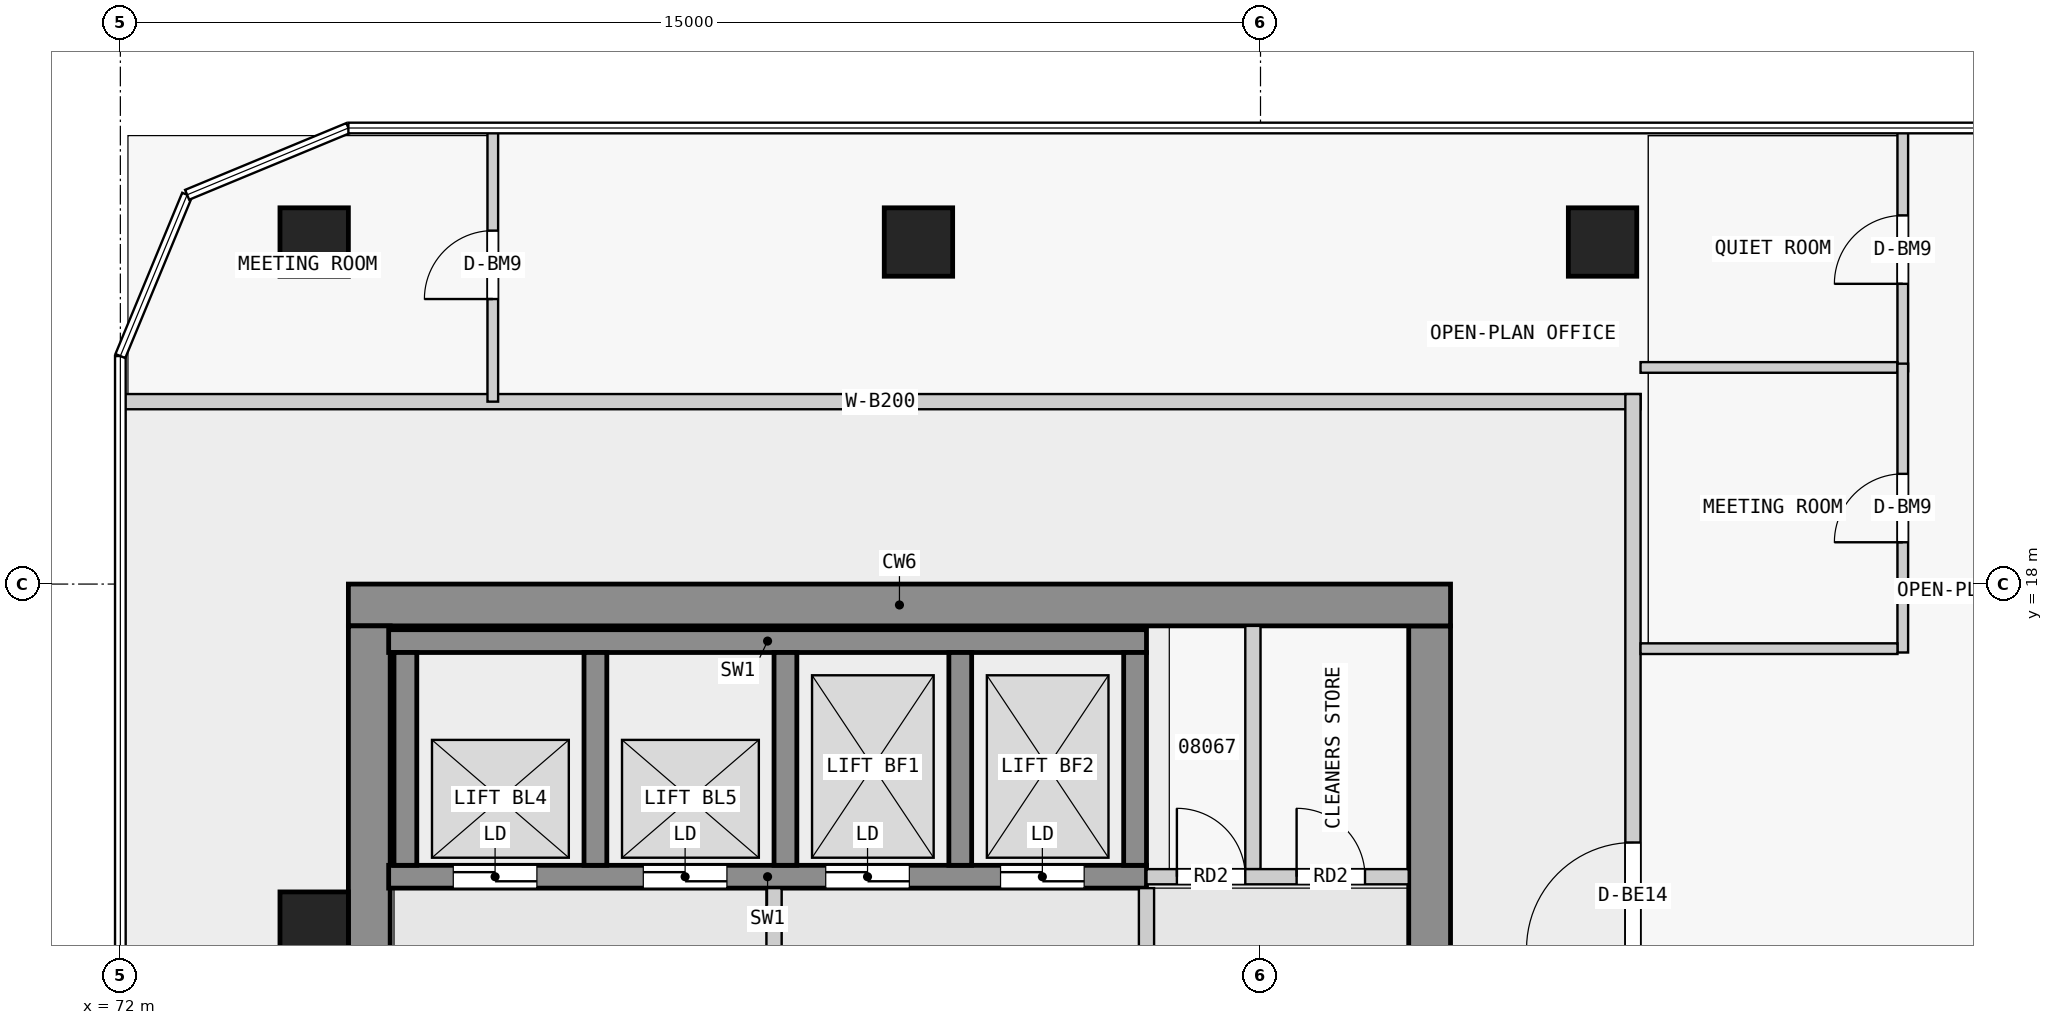
"""IFC4 building model, lengths in metres.
Left out: names, types, materials, properties, quantities, classifications, styles, units other than length and angle.
Written with IfcOpenShell. Run it as: python <this file> out.ifc"""

import sys

from ifc_helpers import new_model, si_unit, direction, frame, frame_2d, origin, origin_2d, place, context, subcontext, project, spatial, rectangle, extrude, element, fill, save


model = new_model("IFC4")
c1 = context("Model", 3, precision=1e-05, world=origin(), true_north=direction((0.0, 1.0)))
c2 = subcontext(c1, "Body", "Model", "MODEL_VIEW")
j1 = project(units=[si_unit("LENGTHUNIT", "METRE"), si_unit("PLANEANGLEUNIT", "RADIAN")], contexts=[c1])
p1 = place(None, origin())
s1 = spatial("IfcSite", under=j1, at=p1, CompositionType="ELEMENT")
p2 = place(p1, origin())
s2 = spatial("IfcBuilding", under=s1, at=p2, CompositionType="ELEMENT")
p3 = place(p2, frame((0.0, 0.0, 37.3)))
s3 = spatial("IfcBuildingStorey", under=s2, at=p3, CompositionType="ELEMENT", Elevation=37.3)
for number, where, z_axis, x_axis in (
    (1, (91.5, 22.5, 0.0), (0.0, 0.0, 1.0), (1.0, 0.0, 0.0)),
    (2, (82.5, 22.5, 0.0), (0.0, 0.0, 1.0), (1.0, 0.0, 0.0)),
    (3, (74.55, 22.5, 0.0), (0.0, 0.0, 1.0), (1.0, 0.0, 0.0)),
    (4, (74.55, 13.5, 0.0), (0.0, 0.0, 1.0), (1.0, 0.0, 0.0)),
):
    element("IfcColumn", number, at=place(p3, frame(where, z_axis=z_axis, x_axis=x_axis)), inside=s3, PredefinedType="COLUMN", context=c2, shape_type="SweptSolid", body=[
        extrude(rectangle(XDim=0.9, YDim=0.9, at=origin_2d()), origin(), (0.0, 0.0, 1.0), 3.5),
    ])
p4 = place(p3, frame((75.0, 17.725, 0.0), z_axis=(0.0, 0.0, 1.0), x_axis=(1.0, 0.0, 0.0)))
e5 = element("IfcWall", 5, at=p4, inside=s3, PredefinedType="SHEAR", context=c2, shape_type="SweptSolid", body=[
    extrude(rectangle(XDim=14.5, YDim=0.55, at=frame_2d((7.25, 0.0))), origin(), (0.0, 0.0, 1.0), 3.25),
])
p5 = place(p3, frame((75.275, 0.55, 0.0), z_axis=(0.0, 0.0, 1.0), x_axis=(0.0, 1.0, 0.0)))
e6 = element("IfcWall", 6, at=p5, inside=s3, PredefinedType="SHEAR", context=c2, shape_type="SweptSolid", body=[
    extrude(rectangle(XDim=16.9, YDim=0.55, at=frame_2d((8.45, 0.0))), origin(), (0.0, 0.0, 1.0), 3.25),
])
p6 = place(p5, frame((7.825, 0.0, 0.0)))
e7 = element("IfcOpeningElement", 7, at=p6, cuts=e6, PredefinedType="OPENING", context=c2, shape_type="SweptSolid", body=[
    extrude(rectangle(XDim=1.8, YDim=2.1, at=frame_2d((0.9, 1.05))), frame((0.0, 0.285, 0.0), z_axis=(0.0, -1.0, 0.0), x_axis=(1.0, 0.0, 0.0)), (0.0, 0.0, 1.0), 0.57),
])
p7 = place(p3, frame((89.225, 0.55, 0.0), z_axis=(0.0, 0.0, 1.0), x_axis=(0.0, 1.0, 0.0)))
e8 = element("IfcWall", 8, at=p7, inside=s3, PredefinedType="SHEAR", context=c2, shape_type="SweptSolid", body=[
    extrude(rectangle(XDim=16.9, YDim=0.55, at=frame_2d((8.45, 0.0))), origin(), (0.0, 0.0, 1.0), 3.25),
])
p8 = place(p7, frame((7.55, 0.0, 0.0)))
e9 = element("IfcOpeningElement", 9, at=p8, cuts=e8, PredefinedType="OPENING", context=c2, shape_type="SweptSolid", body=[
    extrude(rectangle(XDim=1.8, YDim=2.1, at=frame_2d((0.9, 1.05))), frame((0.0, 0.285, 0.0), z_axis=(0.0, -1.0, 0.0), x_axis=(1.0, 0.0, 0.0)), (0.0, 0.0, 1.0), 0.57),
])
p9 = place(p3, frame((75.53, 17.25, 0.0), z_axis=(0.0, 0.0, 1.0), x_axis=(1.0, 0.0, 0.0)))
e10 = element("IfcWall", 10, at=p9, inside=s3, PredefinedType="SHEAR", context=c2, shape_type="SweptSolid", body=[
    extrude(rectangle(XDim=9.97, YDim=0.3, at=frame_2d((4.985, 0.0))), origin(), (0.0, 0.0, 1.0), 3.25),
])
p10 = place(p3, frame((75.53, 14.15, 0.0), z_axis=(0.0, 0.0, 1.0), x_axis=(1.0, 0.0, 0.0)))
e11 = element("IfcWall", 11, at=p10, inside=s3, PredefinedType="SHEAR", context=c2, shape_type="SweptSolid", body=[
    extrude(rectangle(XDim=9.97, YDim=0.3, at=frame_2d((4.985, 0.0))), origin(), (0.0, 0.0, 1.0), 3.25),
])
p11 = place(p10, frame((0.85, 0.0, 0.0)))
e12 = element("IfcOpeningElement", 12, at=p11, cuts=e11, PredefinedType="OPENING", context=c2, shape_type="SweptSolid", body=[
    extrude(rectangle(XDim=1.1, YDim=2.1, at=frame_2d((0.55, 1.05))), frame((0.0, 0.16, 0.0), z_axis=(0.0, -1.0, 0.0), x_axis=(1.0, 0.0, 0.0)), (0.0, 0.0, 1.0), 0.32),
])
p12 = place(p10, frame((3.35, 0.0, 0.0)))
e13 = element("IfcOpeningElement", 13, at=p12, cuts=e11, PredefinedType="OPENING", context=c2, shape_type="SweptSolid", body=[
    extrude(rectangle(XDim=1.1, YDim=2.1, at=frame_2d((0.55, 1.05))), frame((0.0, 0.16, 0.0), z_axis=(0.0, -1.0, 0.0), x_axis=(1.0, 0.0, 0.0)), (0.0, 0.0, 1.0), 0.32),
])
p13 = place(p10, frame((5.75, 0.0, 0.0)))
e14 = element("IfcOpeningElement", 14, at=p13, cuts=e11, PredefinedType="OPENING", context=c2, shape_type="SweptSolid", body=[
    extrude(rectangle(XDim=1.1, YDim=2.1, at=frame_2d((0.55, 1.05))), frame((0.0, 0.16, 0.0), z_axis=(0.0, -1.0, 0.0), x_axis=(1.0, 0.0, 0.0)), (0.0, 0.0, 1.0), 0.32),
])
p14 = place(p10, frame((8.05, 0.0, 0.0)))
e15 = element("IfcOpeningElement", 15, at=p14, cuts=e11, PredefinedType="OPENING", context=c2, shape_type="SweptSolid", body=[
    extrude(rectangle(XDim=1.1, YDim=2.1, at=frame_2d((0.55, 1.05))), frame((0.0, 0.16, 0.0), z_axis=(0.0, -1.0, 0.0), x_axis=(1.0, 0.0, 0.0)), (0.0, 0.0, 1.0), 0.32),
])
for number, where, z_axis, x_axis in (
    (16, (75.75, 14.3, 0.0), (0.0, 0.0, 1.0), (0.0, 1.0, 0.0)),
    (17, (78.25, 14.3, 0.0), (0.0, 0.0, 1.0), (0.0, 1.0, 0.0)),
    (18, (80.75, 14.3, 0.0), (0.0, 0.0, 1.0), (0.0, 1.0, 0.0)),
    (19, (83.05, 14.3, 0.0), (0.0, 0.0, 1.0), (0.0, 1.0, 0.0)),
    (20, (85.35, 14.3, 0.0), (0.0, 0.0, 1.0), (0.0, 1.0, 0.0)),
):
    element("IfcWall", number, at=place(p3, frame(where, z_axis=z_axis, x_axis=x_axis)), inside=s3, PredefinedType="SHEAR", context=c2, shape_type="SweptSolid", body=[
        extrude(rectangle(XDim=2.8, YDim=0.3, at=frame_2d((1.4, 0.0))), origin(), (0.0, 0.0, 1.0), 3.25),
    ])
for number, where, z_axis, x_axis in (
    (21, (80.6, 10.6, 0.0), (0.0, 0.0, 1.0), (0.0, 1.0, 0.0)),
    (22, (85.5, 10.6, 0.0), (0.0, 0.0, 1.0), (0.0, 1.0, 0.0)),
):
    element("IfcWall", number, at=place(p3, frame(where, z_axis=z_axis, x_axis=x_axis)), inside=s3, PredefinedType="PARTITIONING", context=c2, shape_type="SweptSolid", body=[
        extrude(rectangle(XDim=3.4, YDim=0.2, at=frame_2d((1.7, 0.0))), origin(), (0.0, 0.0, 1.0), 3.25),
    ])
p15 = place(p3, frame((85.5, 14.15, 0.0), z_axis=(0.0, 0.0, 1.0), x_axis=(1.0, 0.0, 0.0)))
e23 = element("IfcWall", 23, at=p15, inside=s3, PredefinedType="PARTITIONING", context=c2, shape_type="SweptSolid", body=[
    extrude(rectangle(XDim=3.45, YDim=0.2, at=frame_2d((1.725, 0.0))), origin(), (0.0, 0.0, 1.0), 3.25),
])
p16 = place(p15, frame((0.4, 0.0, 0.0)))
e24 = element("IfcOpeningElement", 24, at=p16, cuts=e23, PredefinedType="OPENING", context=c2, shape_type="SweptSolid", body=[
    extrude(rectangle(XDim=0.9, YDim=2.1, at=frame_2d((0.45, 1.05))), frame((0.0, 0.11, 0.0), z_axis=(0.0, -1.0, 0.0), x_axis=(1.0, 0.0, 0.0)), (0.0, 0.0, 1.0), 0.22),
])
p17 = place(p15, frame((1.975, 0.0, 0.0)))
e25 = element("IfcOpeningElement", 25, at=p17, cuts=e23, PredefinedType="OPENING", context=c2, shape_type="SweptSolid", body=[
    extrude(rectangle(XDim=0.9, YDim=2.1, at=frame_2d((0.45, 1.05))), frame((0.0, 0.11, 0.0), z_axis=(0.0, -1.0, 0.0), x_axis=(1.0, 0.0, 0.0)), (0.0, 0.0, 1.0), 0.22),
])
p18 = place(p3, frame((86.9, 14.25, 0.0), z_axis=(0.0, 0.0, 1.0), x_axis=(0.0, 1.0, 0.0)))
e26 = element("IfcWall", 26, at=p18, inside=s3, PredefinedType="PARTITIONING", context=c2, shape_type="SweptSolid", body=[
    extrude(rectangle(XDim=3.2, YDim=0.2, at=frame_2d((1.6, 0.0))), origin(), (0.0, 0.0, 1.0), 3.25),
])
p19 = place(p3, frame((72.0, 20.4, 0.0), z_axis=(0.0, 0.0, 1.0), x_axis=(1.0, 0.0, 0.0)))
e27 = element("IfcWall", 27, at=p19, inside=s3, PredefinedType="PARTITIONING", context=c2, shape_type="SweptSolid", body=[
    extrude(rectangle(XDim=20.0, YDim=0.2, at=frame_2d((10.0, 0.0))), origin(), (0.0, 0.0, 1.0), 3.25),
])
p20 = place(p3, frame((91.9, 12.2, 0.0), z_axis=(0.0, 0.0, 1.0), x_axis=(0.0, 1.0, 0.0)))
e28 = element("IfcWall", 28, at=p20, inside=s3, PredefinedType="PARTITIONING", context=c2, shape_type="SweptSolid", body=[
    extrude(rectangle(XDim=8.3, YDim=0.2, at=frame_2d((4.15, 0.0))), origin(), (0.0, 0.0, 1.0), 3.25),
])
p21 = place(p20, frame((1.0, 0.0, 0.0)))
e29 = element("IfcOpeningElement", 29, at=p21, cuts=e28, PredefinedType="OPENING", context=c2, shape_type="SweptSolid", body=[
    extrude(rectangle(XDim=1.4, YDim=2.4, at=frame_2d((0.7, 1.2))), frame((0.0, 0.11, 0.0), z_axis=(0.0, -1.0, 0.0), x_axis=(1.0, 0.0, 0.0)), (0.0, 0.0, 1.0), 0.22),
])
p22 = place(p3, frame((95.45, 20.8, 0.0), z_axis=(0.0, 0.0, 1.0), x_axis=(0.0, 1.0, 0.0)))
e30 = element("IfcWall", 30, at=p22, inside=s3, PredefinedType="PARTITIONING", context=c2, shape_type="SweptSolid", body=[
    extrude(rectangle(XDim=3.2, YDim=0.14, at=frame_2d((1.6, 0.0))), origin(), (0.0, 0.0, 1.0), 3.25),
])
p23 = place(p22, frame((1.15, 0.0, 0.0)))
e31 = element("IfcOpeningElement", 31, at=p23, cuts=e30, PredefinedType="OPENING", context=c2, shape_type="SweptSolid", body=[
    extrude(rectangle(XDim=0.9, YDim=2.4, at=frame_2d((0.45, 1.2))), frame((0.0, 0.08, 0.0), z_axis=(0.0, -1.0, 0.0), x_axis=(1.0, 0.0, 0.0)), (0.0, 0.0, 1.0), 0.16),
])
p24 = place(p3, frame((92.0, 20.85, 0.0), z_axis=(0.0, 0.0, 1.0), x_axis=(1.0, 0.0, 0.0)))
e32 = element("IfcWall", 32, at=p24, inside=s3, PredefinedType="PARTITIONING", context=c2, shape_type="SweptSolid", body=[
    extrude(rectangle(XDim=3.38, YDim=0.14, at=frame_2d((1.69, 0.0))), origin(), (0.0, 0.0, 1.0), 3.25),
])
p25 = place(p3, frame((95.45, 17.1, 0.0), z_axis=(0.0, 0.0, 1.0), x_axis=(0.0, 1.0, 0.0)))
e33 = element("IfcWall", 33, at=p25, inside=s3, PredefinedType="PARTITIONING", context=c2, shape_type="SweptSolid", body=[
    extrude(rectangle(XDim=3.8, YDim=0.14, at=frame_2d((1.9, 0.0))), origin(), (0.0, 0.0, 1.0), 3.25),
])
p26 = place(p25, frame((1.45, 0.0, 0.0)))
e34 = element("IfcOpeningElement", 34, at=p26, cuts=e33, PredefinedType="OPENING", context=c2, shape_type="SweptSolid", body=[
    extrude(rectangle(XDim=0.9, YDim=2.4, at=frame_2d((0.45, 1.2))), frame((0.0, 0.08, 0.0), z_axis=(0.0, -1.0, 0.0), x_axis=(1.0, 0.0, 0.0)), (0.0, 0.0, 1.0), 0.16),
])
p27 = place(p3, frame((92.0, 17.15, 0.0), z_axis=(0.0, 0.0, 1.0), x_axis=(1.0, 0.0, 0.0)))
e35 = element("IfcWall", 35, at=p27, inside=s3, PredefinedType="PARTITIONING", context=c2, shape_type="SweptSolid", body=[
    extrude(rectangle(XDim=3.38, YDim=0.14, at=frame_2d((1.69, 0.0))), origin(), (0.0, 0.0, 1.0), 3.25),
])
p28 = place(p3, frame((76.9, 20.4, 0.0), z_axis=(0.0, 0.0, 1.0), x_axis=(0.0, 1.0, 0.0)))
e36 = element("IfcWall", 36, at=p28, inside=s3, PredefinedType="PARTITIONING", context=c2, shape_type="SweptSolid", body=[
    extrude(rectangle(XDim=3.6, YDim=0.14, at=frame_2d((1.8, 0.0))), origin(), (0.0, 0.0, 1.0), 3.25),
])
p29 = place(p28, frame((1.35, 0.0, 0.0)))
e37 = element("IfcOpeningElement", 37, at=p29, cuts=e36, PredefinedType="OPENING", context=c2, shape_type="SweptSolid", body=[
    extrude(rectangle(XDim=0.9, YDim=2.4, at=frame_2d((0.45, 1.2))), frame((0.0, 0.08, 0.0), z_axis=(0.0, -1.0, 0.0), x_axis=(1.0, 0.0, 0.0)), (0.0, 0.0, 1.0), 0.16),
])
p30 = place(p11, origin())
e38 = element("IfcDoor", 38, at=p30, inside=s3, OperationType="DOUBLE_DOOR_SLIDING", PredefinedType="DOOR", context=c2, shape_type="SweptSolid", body=[
    extrude(rectangle(XDim=1.1, YDim=2.1, at=frame_2d((0.55, 1.05))), frame((0.0, 0.025, 0.0), z_axis=(0.0, -1.0, 0.0), x_axis=(1.0, 0.0, 0.0)), (0.0, 0.0, 1.0), 0.05),
])
fill(e12, e38)
p31 = place(p12, origin())
e39 = element("IfcDoor", 39, at=p31, inside=s3, OperationType="DOUBLE_DOOR_SLIDING", PredefinedType="DOOR", context=c2, shape_type="SweptSolid", body=[
    extrude(rectangle(XDim=1.1, YDim=2.1, at=frame_2d((0.55, 1.05))), frame((0.0, 0.025, 0.0), z_axis=(0.0, -1.0, 0.0), x_axis=(1.0, 0.0, 0.0)), (0.0, 0.0, 1.0), 0.05),
])
fill(e13, e39)
p32 = place(p13, origin())
e40 = element("IfcDoor", 40, at=p32, inside=s3, OperationType="DOUBLE_DOOR_SLIDING", PredefinedType="DOOR", context=c2, shape_type="SweptSolid", body=[
    extrude(rectangle(XDim=1.1, YDim=2.1, at=frame_2d((0.55, 1.05))), frame((0.0, 0.025, 0.0), z_axis=(0.0, -1.0, 0.0), x_axis=(1.0, 0.0, 0.0)), (0.0, 0.0, 1.0), 0.05),
])
fill(e14, e40)
p33 = place(p14, origin())
e41 = element("IfcDoor", 41, at=p33, inside=s3, OperationType="DOUBLE_DOOR_SLIDING", PredefinedType="DOOR", context=c2, shape_type="SweptSolid", body=[
    extrude(rectangle(XDim=1.1, YDim=2.1, at=frame_2d((0.55, 1.05))), frame((0.0, 0.025, 0.0), z_axis=(0.0, -1.0, 0.0), x_axis=(1.0, 0.0, 0.0)), (0.0, 0.0, 1.0), 0.05),
])
fill(e15, e41)
p34 = place(p16, origin())
e42 = element("IfcDoor", 42, at=p34, inside=s3, OperationType="SINGLE_SWING_LEFT", PredefinedType="DOOR", context=c2, shape_type="SweptSolid", body=[
    extrude(rectangle(XDim=0.9, YDim=2.1, at=frame_2d((0.45, 1.05))), frame((0.0, 0.025, 0.0), z_axis=(0.0, -1.0, 0.0), x_axis=(1.0, 0.0, 0.0)), (0.0, 0.0, 1.0), 0.05),
])
fill(e24, e42)
p35 = place(p17, origin())
e43 = element("IfcDoor", 43, at=p35, inside=s3, OperationType="SINGLE_SWING_LEFT", PredefinedType="DOOR", context=c2, shape_type="SweptSolid", body=[
    extrude(rectangle(XDim=0.9, YDim=2.1, at=frame_2d((0.45, 1.05))), frame((0.0, 0.025, 0.0), z_axis=(0.0, -1.0, 0.0), x_axis=(1.0, 0.0, 0.0)), (0.0, 0.0, 1.0), 0.05),
])
fill(e25, e43)
p36 = place(p21, origin())
e44 = element("IfcDoor", 44, at=p36, inside=s3, OperationType="DOUBLE_DOOR_SINGLE_SWING", PredefinedType="DOOR", context=c2, shape_type="SweptSolid", body=[
    extrude(rectangle(XDim=1.4, YDim=2.4, at=frame_2d((0.7, 1.2))), frame((0.0, 0.025, 0.0), z_axis=(0.0, -1.0, 0.0), x_axis=(1.0, 0.0, 0.0)), (0.0, 0.0, 1.0), 0.05),
])
fill(e29, e44)
p37 = place(p23, origin())
e45 = element("IfcDoor", 45, at=p37, inside=s3, OperationType="SINGLE_SWING_LEFT", PredefinedType="DOOR", context=c2, shape_type="SweptSolid", body=[
    extrude(rectangle(XDim=0.9, YDim=2.4, at=frame_2d((0.45, 1.2))), frame((0.0, 0.025, 0.0), z_axis=(0.0, -1.0, 0.0), x_axis=(1.0, 0.0, 0.0)), (0.0, 0.0, 1.0), 0.05),
])
fill(e31, e45)
p38 = place(p26, origin())
e46 = element("IfcDoor", 46, at=p38, inside=s3, OperationType="SINGLE_SWING_LEFT", PredefinedType="DOOR", context=c2, shape_type="SweptSolid", body=[
    extrude(rectangle(XDim=0.9, YDim=2.4, at=frame_2d((0.45, 1.2))), frame((0.0, 0.025, 0.0), z_axis=(0.0, -1.0, 0.0), x_axis=(1.0, 0.0, 0.0)), (0.0, 0.0, 1.0), 0.05),
])
fill(e34, e46)
p39 = place(p29, origin())
e47 = element("IfcDoor", 47, at=p39, inside=s3, OperationType="SINGLE_SWING_LEFT", PredefinedType="DOOR", context=c2, shape_type="SweptSolid", body=[
    extrude(rectangle(XDim=0.9, YDim=2.4, at=frame_2d((0.45, 1.2))), frame((0.0, 0.025, 0.0), z_axis=(0.0, -1.0, 0.0), x_axis=(1.0, 0.0, 0.0)), (0.0, 0.0, 1.0), 0.05),
])
fill(e37, e47)
save(model, sys.argv[1])
